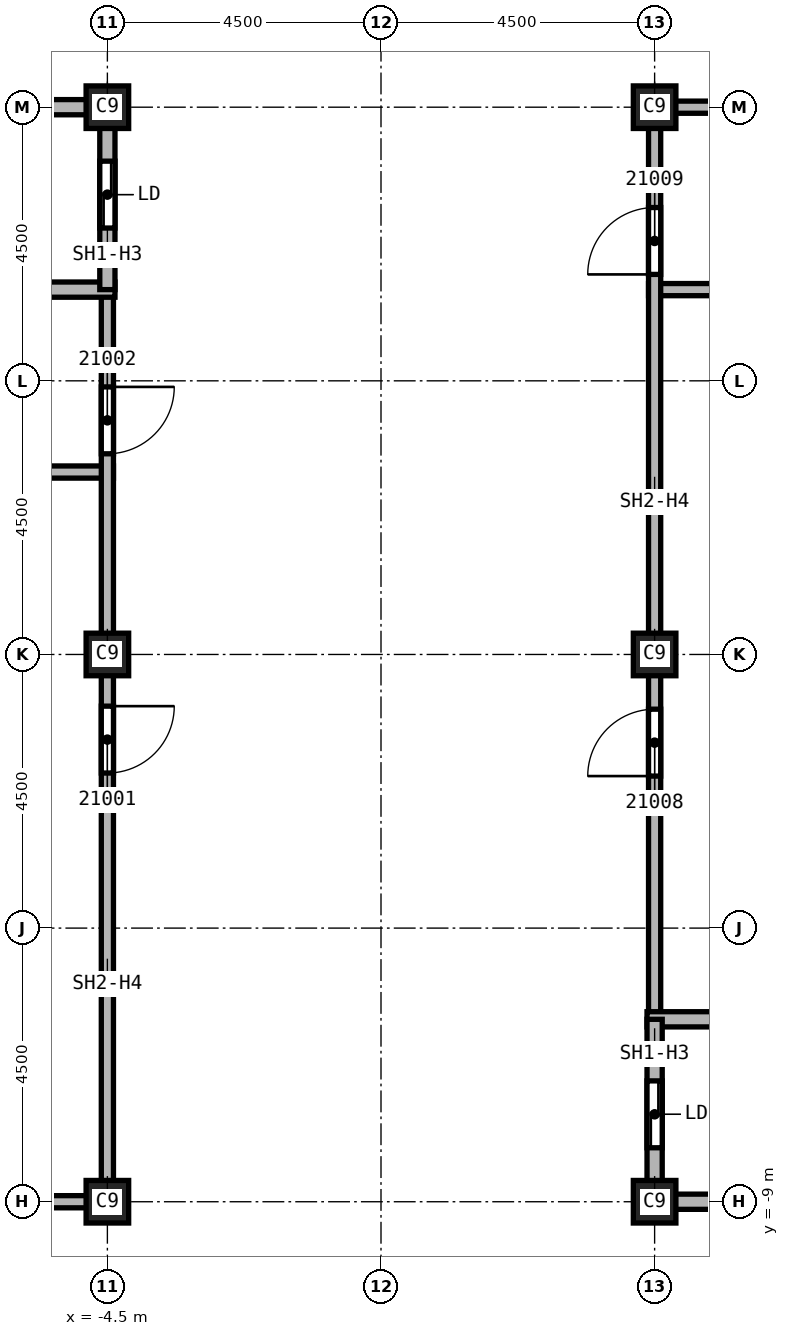
"""IFC4 building model, lengths in metres.
Left out: names, types, materials, properties, quantities, classifications, styles, units other than length and angle.
Written with IfcOpenShell. Run it as: python <this file> out.ifc"""

import sys

from ifc_helpers import new_model, si_unit, direction, frame, frame_2d, origin, origin_2d, place, context, subcontext, project, spatial, rectangle, extrude, element, fill, save


model = new_model("IFC4")
c1 = context("Model", 3, precision=1e-05, world=origin(), true_north=direction((0.0, 1.0)))
c2 = subcontext(c1, "Body", "Model", "MODEL_VIEW")
j1 = project(units=[si_unit("LENGTHUNIT", "METRE"), si_unit("PLANEANGLEUNIT", "RADIAN")], contexts=[c1])
p1 = place(None, origin())
s1 = spatial("IfcSite", under=j1, at=p1, CompositionType="ELEMENT")
p2 = place(p1, origin())
s2 = spatial("IfcBuilding", under=s1, at=p2, CompositionType="ELEMENT")
p3 = place(p2, frame((0.0, 0.0, 304.0)))
s3 = spatial("IfcBuildingStorey", under=s2, at=p3, CompositionType="ELEMENT", Elevation=304.0)
for number, where, z_axis, x_axis in (
    (1, (4.5, 0.0, 0.0), (0.0, 0.0, 1.0), (1.0, 0.0, 0.0)),
    (2, (4.5, 9.0, 0.0), (0.0, 0.0, 1.0), (1.0, 0.0, 0.0)),
    (3, (4.5, -9.0, 0.0), (0.0, 0.0, 1.0), (1.0, 0.0, 0.0)),
    (4, (-4.5, 0.0, 0.0), (0.0, 0.0, 1.0), (1.0, 0.0, 0.0)),
    (5, (-4.5, 9.0, 0.0), (0.0, 0.0, 1.0), (1.0, 0.0, 0.0)),
    (6, (-4.5, -9.0, 0.0), (0.0, 0.0, 1.0), (1.0, 0.0, 0.0)),
):
    element("IfcColumn", number, at=place(p3, frame(where, z_axis=z_axis, x_axis=x_axis)), inside=s3, PredefinedType="COLUMN", context=c2, shape_type="SweptSolid", body=[
        extrude(rectangle(XDim=0.7, YDim=0.7, at=origin_2d()), origin(), (0.0, 0.0, 1.0), 3.74),
    ])
p4 = place(p3, frame((-7.625, 3.0, 0.0), z_axis=(0.0, 0.0, 1.0), x_axis=(1.0, 0.0, 0.0)))
e7 = element("IfcWall", 7, at=p4, inside=s3, PredefinedType="SOLIDWALL", context=c2, shape_type="SweptSolid", body=[
    extrude(rectangle(XDim=3.225, YDim=0.2, at=frame_2d((1.613, 0.0))), origin(), (0.0, 0.0, 1.0), 3.74),
])
p5 = place(p3, frame((-4.5, -9.0, 0.0), z_axis=(0.0, 0.0, 1.0), x_axis=(-1.0, 0.0, 0.0)))
e8 = element("IfcWall", 8, at=p5, inside=s3, PredefinedType="SOLIDWALL", context=c2, shape_type="SweptSolid", body=[
    extrude(rectangle(XDim=3.0, YDim=0.2, at=frame_2d((1.5, 0.0))), origin(), (0.0, 0.0, 1.0), 3.062),
])
p6 = place(p3, frame((-4.5, 6.0, 0.0), z_axis=(0.0, 0.0, 1.0), x_axis=(0.0, -1.0, 0.0)))
e9 = element("IfcWall", 9, at=p6, inside=s3, PredefinedType="SOLIDWALL", context=c2, shape_type="SweptSolid", body=[
    extrude(rectangle(XDim=15.1, YDim=0.2, at=frame_2d((7.55, 0.0))), origin(), (0.0, 0.0, 1.0), 3.062),
])
p7 = place(p6, frame((6.85, 0.0, 0.0)))
e10 = element("IfcOpeningElement", 10, at=p7, cuts=e9, PredefinedType="OPENING", context=c2, shape_type="SweptSolid", body=[
    extrude(rectangle(XDim=1.1, YDim=2.1, at=frame_2d((0.55, 1.05))), frame((0.0, 0.1, 0.0), z_axis=(0.0, -1.0, 0.0), x_axis=(1.0, 0.0, 0.0)), (0.0, 0.0, 1.0), 0.2),
])
p8 = place(p6, frame((1.6, 0.0, 0.0)))
e11 = element("IfcOpeningElement", 11, at=p8, cuts=e9, PredefinedType="OPENING", context=c2, shape_type="SweptSolid", body=[
    extrude(rectangle(XDim=1.1, YDim=2.1, at=frame_2d((0.55, 1.05))), frame((0.0, 0.1, 0.0), z_axis=(0.0, -1.0, 0.0), x_axis=(1.0, 0.0, 0.0)), (0.0, 0.0, 1.0), 0.2),
])
p9 = place(p3, frame((4.4, 6.0, 0.0), z_axis=(0.0, 0.0, 1.0), x_axis=(1.0, 0.0, 0.0)))
e12 = element("IfcWall", 12, at=p9, inside=s3, PredefinedType="SOLIDWALL", context=c2, shape_type="SweptSolid", body=[
    extrude(rectangle(XDim=3.2, YDim=0.2, at=frame_2d((1.6, 0.0))), origin(), (0.0, 0.0, 1.0), 3.74),
])
p10 = place(p3, frame((4.5, -6.0, 0.0), z_axis=(0.0, 0.0, 1.0), x_axis=(0.0, 1.0, 0.0)))
e13 = element("IfcWall", 13, at=p10, inside=s3, PredefinedType="SOLIDWALL", context=c2, shape_type="SweptSolid", body=[
    extrude(rectangle(XDim=15.1, YDim=0.2, at=frame_2d((7.55, 0.0))), origin(), (0.0, 0.0, 1.0), 3.062),
])
p11 = place(p10, frame((4.0, 0.0, 0.0)))
e14 = element("IfcOpeningElement", 14, at=p11, cuts=e13, PredefinedType="OPENING", context=c2, shape_type="SweptSolid", body=[
    extrude(rectangle(XDim=1.1, YDim=2.1, at=frame_2d((0.55, 1.05))), frame((0.0, 0.1, 0.0), z_axis=(0.0, -1.0, 0.0), x_axis=(1.0, 0.0, 0.0)), (0.0, 0.0, 1.0), 0.2),
])
p12 = place(p10, frame((12.25, 0.0, 0.0)))
e15 = element("IfcOpeningElement", 15, at=p12, cuts=e13, PredefinedType="OPENING", context=c2, shape_type="SweptSolid", body=[
    extrude(rectangle(XDim=1.1, YDim=2.1, at=frame_2d((0.55, 1.05))), frame((0.0, 0.1, 0.0), z_axis=(0.0, -1.0, 0.0), x_axis=(1.0, 0.0, 0.0)), (0.0, 0.0, 1.0), 0.2),
])
p13 = place(p3, frame((4.5, 9.0, 0.0), z_axis=(0.0, 0.0, 1.0), x_axis=(1.0, 0.0, 0.0)))
e16 = element("IfcWall", 16, at=p13, inside=s3, PredefinedType="SOLIDWALL", context=c2, shape_type="SweptSolid", body=[
    extrude(rectangle(XDim=3.0, YDim=0.2, at=frame_2d((1.5, 0.0))), origin(), (0.0, 0.0, 1.0), 3.062),
])
p14 = place(p3, frame((-7.625, 6.0, 0.0), z_axis=(0.0, 0.0, 1.0), x_axis=(1.0, 0.0, 0.0)))
e17 = element("IfcWall", 17, at=p14, inside=s3, PredefinedType="SOLIDWALL", context=c2, shape_type="SweptSolid", body=[
    extrude(rectangle(XDim=3.25, YDim=0.25, at=frame_2d((1.625, 0.0))), origin(), (0.0, 0.0, 1.0), 3.74),
])
p15 = place(p3, frame((-7.5, 9.0, 0.0), z_axis=(0.0, 0.0, 1.0), x_axis=(1.0, 0.0, 0.0)))
e18 = element("IfcWall", 18, at=p15, inside=s3, PredefinedType="SOLIDWALL", context=c2, shape_type="SweptSolid", body=[
    extrude(rectangle(XDim=3.0, YDim=0.25, at=frame_2d((1.5, 0.0))), origin(), (0.0, 0.0, 1.0), 3.062),
])
p16 = place(p3, frame((-4.5, 9.125, 0.0), z_axis=(0.0, 0.0, 1.0), x_axis=(0.0, -1.0, 0.0)))
e19 = element("IfcWall", 19, at=p16, inside=s3, PredefinedType="SOLIDWALL", context=c2, shape_type="SweptSolid", body=[
    extrude(rectangle(XDim=3.125, YDim=0.25, at=frame_2d((1.562, 0.0))), origin(), (0.0, 0.0, 1.0), 3.062),
])
p17 = place(p16, frame((1.012, 0.0, 0.0)))
e20 = element("IfcOpeningElement", 20, at=p17, cuts=e19, PredefinedType="OPENING", context=c2, shape_type="SweptSolid", body=[
    extrude(rectangle(XDim=1.1, YDim=2.1, at=frame_2d((0.55, 1.05))), frame((0.0, 0.125, 0.0), z_axis=(0.0, -1.0, 0.0), x_axis=(1.0, 0.0, 0.0)), (0.0, 0.0, 1.0), 0.25),
])
p18 = place(p3, frame((4.375, -6.0, 0.0), z_axis=(0.0, 0.0, 1.0), x_axis=(1.0, 0.0, 0.0)))
e21 = element("IfcWall", 21, at=p18, inside=s3, PredefinedType="SOLIDWALL", context=c2, shape_type="SweptSolid", body=[
    extrude(rectangle(XDim=3.25, YDim=0.25, at=frame_2d((1.625, 0.0))), origin(), (0.0, 0.0, 1.0), 3.74),
])
p19 = place(p3, frame((4.5, -9.125, 0.0), z_axis=(0.0, 0.0, 1.0), x_axis=(0.0, 1.0, 0.0)))
e22 = element("IfcWall", 22, at=p19, inside=s3, PredefinedType="SOLIDWALL", context=c2, shape_type="SweptSolid", body=[
    extrude(rectangle(XDim=3.125, YDim=0.25, at=frame_2d((1.562, 0.0))), origin(), (0.0, 0.0, 1.0), 3.062),
])
p20 = place(p19, frame((1.012, 0.0, 0.0)))
e23 = element("IfcOpeningElement", 23, at=p20, cuts=e22, PredefinedType="OPENING", context=c2, shape_type="SweptSolid", body=[
    extrude(rectangle(XDim=1.1, YDim=2.1, at=frame_2d((0.55, 1.05))), frame((0.0, 0.125, 0.0), z_axis=(0.0, -1.0, 0.0), x_axis=(1.0, 0.0, 0.0)), (0.0, 0.0, 1.0), 0.25),
])
p21 = place(p3, frame((7.5, -9.0, 0.0), z_axis=(0.0, 0.0, 1.0), x_axis=(-1.0, 0.0, 0.0)))
e24 = element("IfcWall", 24, at=p21, inside=s3, PredefinedType="SOLIDWALL", context=c2, shape_type="SweptSolid", body=[
    extrude(rectangle(XDim=3.0, YDim=0.25, at=frame_2d((1.5, 0.0))), origin(), (0.0, 0.0, 1.0), 3.062),
])
p22 = place(p7, origin())
e25 = element("IfcDoor", 25, at=p22, inside=s3, OperationType="SINGLE_SWING_RIGHT", PredefinedType="DOOR", context=c2, shape_type="SweptSolid", body=[
    extrude(rectangle(XDim=1.1, YDim=2.1, at=frame_2d((0.55, 1.05))), frame((0.0, 0.025, 0.0), z_axis=(0.0, -1.0, 0.0), x_axis=(1.0, 0.0, 0.0)), (0.0, 0.0, 1.0), 0.05),
])
fill(e10, e25)
p23 = place(p8, origin())
e26 = element("IfcDoor", 26, at=p23, inside=s3, OperationType="SINGLE_SWING_LEFT", PredefinedType="DOOR", context=c2, shape_type="SweptSolid", body=[
    extrude(rectangle(XDim=1.1, YDim=2.1, at=frame_2d((0.55, 1.05))), frame((0.0, 0.025, 0.0), z_axis=(0.0, -1.0, 0.0), x_axis=(1.0, 0.0, 0.0)), (0.0, 0.0, 1.0), 0.05),
])
fill(e11, e26)
p24 = place(p11, origin())
e27 = element("IfcDoor", 27, at=p24, inside=s3, OperationType="SINGLE_SWING_LEFT", PredefinedType="DOOR", context=c2, shape_type="SweptSolid", body=[
    extrude(rectangle(XDim=1.1, YDim=2.1, at=frame_2d((0.55, 1.05))), frame((0.0, 0.025, 0.0), z_axis=(0.0, -1.0, 0.0), x_axis=(1.0, 0.0, 0.0)), (0.0, 0.0, 1.0), 0.05),
])
fill(e14, e27)
p25 = place(p12, origin())
e28 = element("IfcDoor", 28, at=p25, inside=s3, OperationType="SINGLE_SWING_RIGHT", PredefinedType="DOOR", context=c2, shape_type="SweptSolid", body=[
    extrude(rectangle(XDim=1.1, YDim=2.1, at=frame_2d((0.55, 1.05))), frame((0.0, 0.025, 0.0), z_axis=(0.0, -1.0, 0.0), x_axis=(1.0, 0.0, 0.0)), (0.0, 0.0, 1.0), 0.05),
])
fill(e15, e28)
p26 = place(p17, origin())
e29 = element("IfcDoor", 29, at=p26, inside=s3, OperationType="SLIDING_TO_LEFT", PredefinedType="DOOR", context=c2, shape_type="SweptSolid", body=[
    extrude(rectangle(XDim=1.1, YDim=2.1, at=frame_2d((0.55, 1.05))), frame((0.0, 0.025, 0.0), z_axis=(0.0, -1.0, 0.0), x_axis=(1.0, 0.0, 0.0)), (0.0, 0.0, 1.0), 0.05),
])
fill(e20, e29)
p27 = place(p20, origin())
e30 = element("IfcDoor", 30, at=p27, inside=s3, OperationType="SLIDING_TO_LEFT", PredefinedType="DOOR", context=c2, shape_type="SweptSolid", body=[
    extrude(rectangle(XDim=1.1, YDim=2.1, at=frame_2d((0.55, 1.05))), frame((0.0, 0.025, 0.0), z_axis=(0.0, -1.0, 0.0), x_axis=(1.0, 0.0, 0.0)), (0.0, 0.0, 1.0), 0.05),
])
fill(e23, e30)
save(model, sys.argv[1])
